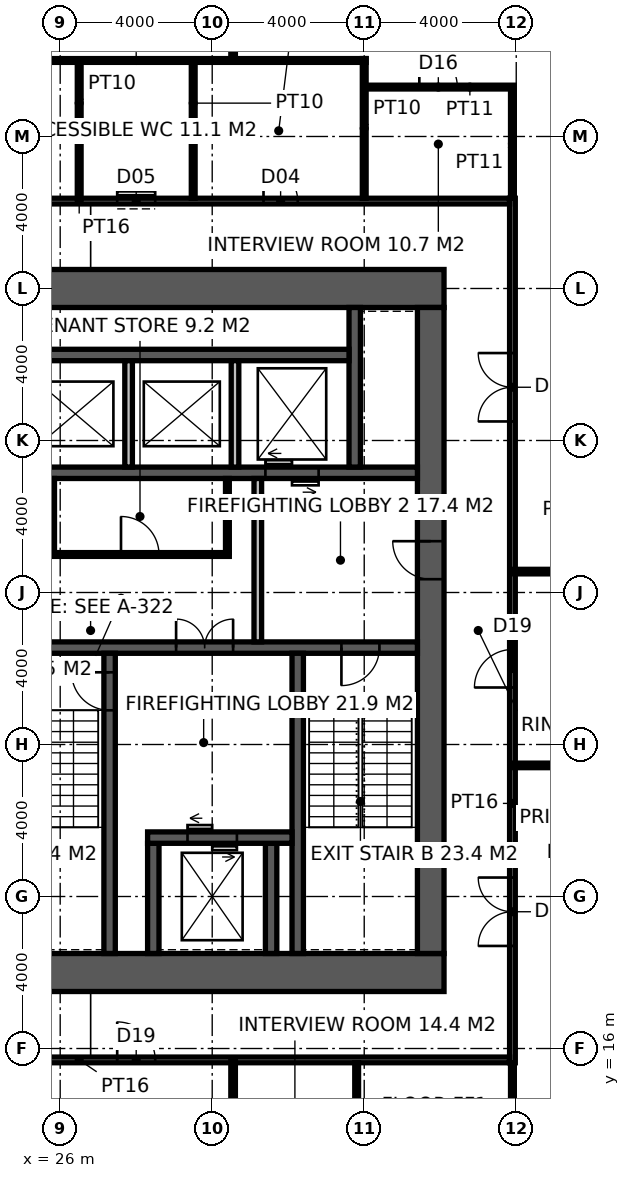
"""IFC4 building model, lengths in metres.
Left out: names, types, materials, properties, quantities, classifications, styles, units other than length and angle.
Written with IfcOpenShell. Run it as: python <this file> out.ifc"""

import sys

from ifc_helpers import new_model, si_unit, direction, frame, frame_2d, origin, place, context, subcontext, project, spatial, rectangle, extrude, element, fill, save


model = new_model("IFC4")
c1 = context("Model", 3, precision=1e-05, world=origin(), true_north=direction((0.0, 1.0)))
c2 = subcontext(c1, "Body", "Model", "MODEL_VIEW")
j1 = project(units=[si_unit("LENGTHUNIT", "METRE"), si_unit("PLANEANGLEUNIT", "RADIAN")], contexts=[c1])
p1 = place(None, origin())
s1 = spatial("IfcSite", under=j1, at=p1, CompositionType="ELEMENT")
p2 = place(p1, origin())
s2 = spatial("IfcBuilding", under=s1, at=p2, CompositionType="ELEMENT")
p3 = place(p2, frame((0.0, 0.0, 105.4)))
s3 = spatial("IfcBuildingStorey", under=s2, at=p3, CompositionType="ELEMENT", Elevation=105.4)
p4 = place(p3, frame((18.5, 18.0, -0.15), z_axis=(0.0, 0.0, 1.0), x_axis=(1.0, 0.0, 0.0)))
e1 = element("IfcWall", 1, at=p4, inside=s3, PredefinedType="SHEAR", context=c2, shape_type="SweptSolid", body=[
    extrude(rectangle(XDim=17.6, YDim=1.0, at=frame_2d((8.8, 0.0))), origin(), (0.0, 0.0, 1.0), 4.0),
])
p5 = place(p4, frame((3.45, 0.0, 0.15)))
e2 = element("IfcOpeningElement", 2, at=p5, cuts=e1, PredefinedType="OPENING", context=c2, shape_type="SweptSolid", body=[
    extrude(rectangle(XDim=1.5, YDim=2.4, at=frame_2d((0.75, 1.2))), frame((0.0, 0.51, 0.0), z_axis=(0.0, -1.0, 0.0), x_axis=(1.0, 0.0, 0.0)), (0.0, 0.0, 1.0), 1.02),
])
p6 = place(p3, frame((18.5, 36.0, -0.15), z_axis=(0.0, 0.0, 1.0), x_axis=(1.0, 0.0, 0.0)))
e3 = element("IfcWall", 3, at=p6, inside=s3, PredefinedType="SHEAR", context=c2, shape_type="SweptSolid", body=[
    extrude(rectangle(XDim=17.6, YDim=1.0, at=frame_2d((8.8, 0.0))), origin(), (0.0, 0.0, 1.0), 4.0),
])
p7 = place(p3, frame((35.75, 18.5, -0.15), z_axis=(0.0, 0.0, 1.0), x_axis=(0.0, 1.0, 0.0)))
e4 = element("IfcWall", 4, at=p7, inside=s3, PredefinedType="SHEAR", context=c2, shape_type="SweptSolid", body=[
    extrude(rectangle(XDim=17.0, YDim=0.7, at=frame_2d((8.5, 0.0))), origin(), (0.0, 0.0, 1.0), 4.0),
])
p8 = place(p7, frame((9.85, 0.0, 0.15)))
e5 = element("IfcOpeningElement", 5, at=p8, cuts=e4, PredefinedType="OPENING", context=c2, shape_type="SweptSolid", body=[
    extrude(rectangle(XDim=1.0, YDim=2.2, at=frame_2d((0.5, 1.1))), frame((0.0, 0.36, 0.0), z_axis=(0.0, -1.0, 0.0), x_axis=(1.0, 0.0, 0.0)), (0.0, 0.0, 1.0), 0.72),
])
p9 = place(p3, frame((24.15, 26.55, -0.15), z_axis=(0.0, 0.0, 1.0), x_axis=(1.0, 0.0, 0.0)))
e6 = element("IfcWall", 6, at=p9, inside=s3, PredefinedType="SHEAR", context=c2, shape_type="SweptSolid", body=[
    extrude(rectangle(XDim=11.25, YDim=0.3, at=frame_2d((5.625, 0.0))), origin(), (0.0, 0.0, 1.0), 4.0),
])
p10 = place(p9, frame((9.25, 0.0, 0.15)))
e7 = element("IfcOpeningElement", 7, at=p10, cuts=e6, PredefinedType="OPENING", context=c2, shape_type="SweptSolid", body=[
    extrude(rectangle(XDim=1.0, YDim=2.2, at=frame_2d((0.5, 1.1))), frame((0.0, 0.16, 0.0), z_axis=(0.0, -1.0, 0.0), x_axis=(1.0, 0.0, 0.0)), (0.0, 0.0, 1.0), 0.32),
])
p11 = place(p9, frame((4.9, 0.0, 0.15)))
e8 = element("IfcOpeningElement", 8, at=p11, cuts=e6, PredefinedType="OPENING", context=c2, shape_type="SweptSolid", body=[
    extrude(rectangle(XDim=1.5, YDim=2.4, at=frame_2d((0.75, 1.2))), frame((0.0, 0.16, 0.0), z_axis=(0.0, -1.0, 0.0), x_axis=(1.0, 0.0, 0.0)), (0.0, 0.0, 1.0), 0.32),
])
p12 = place(p3, frame((27.3, 18.5, -0.15), z_axis=(0.0, 0.0, 1.0), x_axis=(0.0, 1.0, 0.0)))
e9 = element("IfcWall", 9, at=p12, inside=s3, PredefinedType="SHEAR", context=c2, shape_type="SweptSolid", body=[
    extrude(rectangle(XDim=7.9, YDim=0.3, at=frame_2d((3.95, 0.0))), origin(), (0.0, 0.0, 1.0), 4.0),
])
p13 = place(p12, frame((6.4, 0.0, 0.15)))
e10 = element("IfcOpeningElement", 10, at=p13, cuts=e9, PredefinedType="OPENING", context=c2, shape_type="SweptSolid", body=[
    extrude(rectangle(XDim=1.0, YDim=2.2, at=frame_2d((0.5, 1.1))), frame((0.0, 0.16, 0.0), z_axis=(0.0, -1.0, 0.0), x_axis=(1.0, 0.0, 0.0)), (0.0, 0.0, 1.0), 0.32),
])
p14 = place(p3, frame((32.25, 18.5, -0.15), z_axis=(0.0, 0.0, 1.0), x_axis=(0.0, 1.0, 0.0)))
e11 = element("IfcWall", 11, at=p14, inside=s3, PredefinedType="SHEAR", context=c2, shape_type="SweptSolid", body=[
    extrude(rectangle(XDim=7.9, YDim=0.3, at=frame_2d((3.95, 0.0))), origin(), (0.0, 0.0, 1.0), 4.0),
])
for number, where, z_axis, x_axis in (
    (12, (28.45, 18.5, -0.15), (0.0, 0.0, 1.0), (0.0, 1.0, 0.0)),
    (13, (31.55, 18.5, -0.15), (0.0, 0.0, 1.0), (0.0, 1.0, 0.0)),
):
    element("IfcWall", number, at=place(p3, frame(where, z_axis=z_axis, x_axis=x_axis)), inside=s3, PredefinedType="SHEAR", context=c2, shape_type="SweptSolid", body=[
        extrude(rectangle(XDim=2.9, YDim=0.3, at=frame_2d((1.45, 0.0))), origin(), (0.0, 0.0, 1.0), 4.0),
    ])
p15 = place(p3, frame((28.3, 21.55, -0.15), z_axis=(0.0, 0.0, 1.0), x_axis=(1.0, 0.0, 0.0)))
e14 = element("IfcWall", 14, at=p15, inside=s3, PredefinedType="SHEAR", context=c2, shape_type="SweptSolid", body=[
    extrude(rectangle(XDim=3.8, YDim=0.3, at=frame_2d((1.9, 0.0))), origin(), (0.0, 0.0, 1.0), 4.0),
])
p16 = place(p15, frame((1.05, 0.0, 0.15)))
e15 = element("IfcOpeningElement", 15, at=p16, cuts=e14, PredefinedType="OPENING", context=c2, shape_type="SweptSolid", body=[
    extrude(rectangle(XDim=1.3, YDim=2.4, at=frame_2d((0.65, 1.2))), frame((0.0, 0.16, 0.0), z_axis=(0.0, -1.0, 0.0), x_axis=(1.0, 0.0, 0.0)), (0.0, 0.0, 1.0), 0.32),
])
p17 = place(p3, frame((24.15, 31.15, -0.15), z_axis=(0.0, 0.0, 1.0), x_axis=(1.0, 0.0, 0.0)))
e16 = element("IfcWall", 16, at=p17, inside=s3, PredefinedType="SHEAR", context=c2, shape_type="SweptSolid", body=[
    extrude(rectangle(XDim=11.25, YDim=0.3, at=frame_2d((5.625, 0.0))), origin(), (0.0, 0.0, 1.0), 4.0),
])
p18 = place(p17, frame((7.25, 0.0, 0.15)))
e17 = element("IfcOpeningElement", 17, at=p18, cuts=e16, PredefinedType="OPENING", context=c2, shape_type="SweptSolid", body=[
    extrude(rectangle(XDim=1.4, YDim=2.4, at=frame_2d((0.7, 1.2))), frame((0.0, 0.16, 0.0), z_axis=(0.0, -1.0, 0.0), x_axis=(1.0, 0.0, 0.0)), (0.0, 0.0, 1.0), 0.32),
])
p19 = place(p3, frame((33.75, 31.3, -0.15), z_axis=(0.0, 0.0, 1.0), x_axis=(0.0, 1.0, 0.0)))
e18 = element("IfcWall", 18, at=p19, inside=s3, PredefinedType="SHEAR", context=c2, shape_type="SweptSolid", body=[
    extrude(rectangle(XDim=4.2, YDim=0.3, at=frame_2d((2.1, 0.0))), origin(), (0.0, 0.0, 1.0), 4.0),
])
p20 = place(p3, frame((25.0, 34.25, -0.15), z_axis=(0.0, 0.0, 1.0), x_axis=(1.0, 0.0, 0.0)))
e19 = element("IfcWall", 19, at=p20, inside=s3, PredefinedType="SHEAR", context=c2, shape_type="SweptSolid", body=[
    extrude(rectangle(XDim=8.6, YDim=0.3, at=frame_2d((4.3, 0.0))), origin(), (0.0, 0.0, 1.0), 4.0),
])
for number, where, z_axis, x_axis in (
    (20, (27.8, 31.3, -0.15), (0.0, 0.0, 1.0), (0.0, 1.0, 0.0)),
    (21, (30.6, 31.3, -0.15), (0.0, 0.0, 1.0), (0.0, 1.0, 0.0)),
):
    element("IfcWall", number, at=place(p3, frame(where, z_axis=z_axis, x_axis=x_axis)), inside=s3, PredefinedType="SOLIDWALL", context=c2, shape_type="SweptSolid", body=[
        extrude(rectangle(XDim=2.8, YDim=0.2, at=frame_2d((1.4, 0.0))), origin(), (0.0, 0.0, 1.0), 4.0),
    ])
p21 = place(p3, frame((31.2, 26.7, 0.0), z_axis=(0.0, 0.0, 1.0), x_axis=(0.0, 1.0, 0.0)))
e22 = element("IfcWall", 22, at=p21, inside=s3, PredefinedType="SOLIDWALL", context=c2, shape_type="SweptSolid", body=[
    extrude(rectangle(XDim=4.3, YDim=0.2, at=frame_2d((2.15, 0.0))), origin(), (0.0, 0.0, 1.0), 3.85),
])
p22 = place(p3, frame((25.75, 29.0, 0.0), z_axis=(0.0, 0.0, 1.0), x_axis=(1.0, 0.0, 0.0)))
e23 = element("IfcWall", 23, at=p22, inside=s3, PredefinedType="PARTITIONING", context=c2, shape_type="SweptSolid", body=[
    extrude(rectangle(XDim=4.7, YDim=0.1, at=frame_2d((2.35, 0.0))), origin(), (0.0, 0.0, 1.0), 3.85),
])
p23 = place(p22, frame((1.85, 0.0, 0.0)))
e24 = element("IfcOpeningElement", 24, at=p23, cuts=e23, PredefinedType="OPENING", context=c2, shape_type="SweptSolid", body=[
    extrude(rectangle(XDim=1.0, YDim=2.2, at=frame_2d((0.5, 1.1))), frame((0.0, 0.06, 0.0), z_axis=(0.0, -1.0, 0.0), x_axis=(1.0, 0.0, 0.0)), (0.0, 0.0, 1.0), 0.12),
])
for number, where, z_axis, x_axis in (
    (25, (25.8, 29.05, 0.0), (0.0, 0.0, 1.0), (0.0, 1.0, 0.0)),
    (26, (30.4, 29.05, 0.0), (0.0, 0.0, 1.0), (0.0, 1.0, 0.0)),
):
    element("IfcWall", number, at=place(p3, frame(where, z_axis=z_axis, x_axis=x_axis)), inside=s3, PredefinedType="PARTITIONING", context=c2, shape_type="SweptSolid", body=[
        extrude(rectangle(XDim=1.95, YDim=0.1, at=frame_2d((0.975, 0.0))), origin(), (0.0, 0.0, 1.0), 3.85),
    ])
p24 = place(p3, frame((37.9, 15.625, 0.0), z_axis=(0.0, 0.0, 1.0), x_axis=(0.0, 1.0, 0.0)))
e27 = element("IfcWall", 27, at=p24, inside=s3, PredefinedType="PARTITIONING", context=c2, shape_type="SweptSolid", body=[
    extrude(rectangle(XDim=22.75, YDim=0.15, at=frame_2d((11.375, 0.0))), origin(), (0.0, 0.0, 1.0), 2.65),
])
p25 = place(p24, frame((3.074, 0.0, 0.0)))
e28 = element("IfcOpeningElement", 28, at=p25, cuts=e27, PredefinedType="OPENING", context=c2, shape_type="SweptSolid", body=[
    extrude(rectangle(XDim=1.8, YDim=2.4, at=frame_2d((0.9, 1.2))), frame((0.0, 0.085, 0.0), z_axis=(0.0, -1.0, 0.0), x_axis=(1.0, 0.0, 0.0)), (0.0, 0.0, 1.0), 0.17),
])
p26 = place(p24, frame((16.876, 0.0, 0.0)))
e29 = element("IfcOpeningElement", 29, at=p26, cuts=e27, PredefinedType="OPENING", context=c2, shape_type="SweptSolid", body=[
    extrude(rectangle(XDim=1.8, YDim=2.4, at=frame_2d((0.9, 1.2))), frame((0.0, 0.085, 0.0), z_axis=(0.0, -1.0, 0.0), x_axis=(1.0, 0.0, 0.0)), (0.0, 0.0, 1.0), 0.17),
])
p27 = place(p24, frame((9.875, 0.0, 0.0)))
e30 = element("IfcOpeningElement", 30, at=p27, cuts=e27, PredefinedType="OPENING", context=c2, shape_type="SweptSolid", body=[
    extrude(rectangle(XDim=1.0, YDim=2.2, at=frame_2d((0.5, 1.1))), frame((0.0, 0.085, 0.0), z_axis=(0.0, -1.0, 0.0), x_axis=(1.0, 0.0, 0.0)), (0.0, 0.0, 1.0), 0.17),
])
p28 = place(p3, frame((15.175, 15.7, 0.0), z_axis=(0.0, 0.0, 1.0), x_axis=(1.0, 0.0, 0.0)))
e31 = element("IfcWall", 31, at=p28, inside=s3, PredefinedType="PARTITIONING", context=c2, shape_type="SweptSolid", body=[
    extrude(rectangle(XDim=22.65, YDim=0.15, at=frame_2d((11.325, 0.0))), origin(), (0.0, 0.0, 1.0), 3.85),
])
p29 = place(p28, frame((12.325, 0.0, 0.0)))
e32 = element("IfcOpeningElement", 32, at=p29, cuts=e31, PredefinedType="OPENING", context=c2, shape_type="SweptSolid", body=[
    extrude(rectangle(XDim=1.0, YDim=2.2, at=frame_2d((0.5, 1.1))), frame((0.0, 0.085, 0.0), z_axis=(0.0, -1.0, 0.0), x_axis=(1.0, 0.0, 0.0)), (0.0, 0.0, 1.0), 0.17),
])
p30 = place(p3, frame((15.175, 38.3, 0.0), z_axis=(0.0, 0.0, 1.0), x_axis=(1.0, 0.0, 0.0)))
e33 = element("IfcWall", 33, at=p30, inside=s3, PredefinedType="PARTITIONING", context=c2, shape_type="SweptSolid", body=[
    extrude(rectangle(XDim=22.65, YDim=0.15, at=frame_2d((11.325, 0.0))), origin(), (0.0, 0.0, 1.0), 3.85),
])
p31 = place(p30, frame((8.575, 0.0, 0.0)))
e34 = element("IfcOpeningElement", 34, at=p31, cuts=e33, PredefinedType="OPENING", context=c2, shape_type="SweptSolid", body=[
    extrude(rectangle(XDim=0.9, YDim=2.1, at=frame_2d((0.45, 1.05))), frame((0.0, 0.085, 0.0), z_axis=(0.0, -1.0, 0.0), x_axis=(1.0, 0.0, 0.0)), (0.0, 0.0, 1.0), 0.17),
])
p32 = place(p30, frame((12.325, 0.0, 0.0)))
e35 = element("IfcOpeningElement", 35, at=p32, cuts=e33, PredefinedType="OPENING", context=c2, shape_type="SweptSolid", body=[
    extrude(rectangle(XDim=1.0, YDim=2.1, at=frame_2d((0.5, 1.05))), frame((0.0, 0.085, 0.0), z_axis=(0.0, -1.0, 0.0), x_axis=(1.0, 0.0, 0.0)), (0.0, 0.0, 1.0), 0.17),
])
p33 = place(p30, frame((16.175, 0.0, 0.0)))
e36 = element("IfcOpeningElement", 36, at=p33, cuts=e33, PredefinedType="OPENING", context=c2, shape_type="SweptSolid", body=[
    extrude(rectangle(XDim=0.9, YDim=2.1, at=frame_2d((0.45, 1.05))), frame((0.0, 0.085, 0.0), z_axis=(0.0, -1.0, 0.0), x_axis=(1.0, 0.0, 0.0)), (0.0, 0.0, 1.0), 0.17),
])
p34 = place(p3, frame((34.0, 38.375, 0.0), z_axis=(0.0, 0.0, 1.0), x_axis=(0.0, 1.0, 0.0)))
e37 = element("IfcWall", 37, at=p34, inside=s3, PredefinedType="PARTITIONING", context=c2, shape_type="SweptSolid", body=[
    extrude(rectangle(XDim=3.675, YDim=0.1, at=frame_2d((1.837, 0.0))), origin(), (0.0, 0.0, 1.0), 2.95),
])
p35 = place(p3, frame((21.95, 42.0, 0.0), z_axis=(0.0, 0.0, 1.0), x_axis=(1.0, 0.0, 0.0)))
e38 = element("IfcWall", 38, at=p35, inside=s3, PredefinedType="PARTITIONING", context=c2, shape_type="SweptSolid", body=[
    extrude(rectangle(XDim=12.1, YDim=0.1, at=frame_2d((6.05, 0.0))), origin(), (0.0, 0.0, 1.0), 3.85),
])
for number, where, z_axis, x_axis in (
    (39, (26.5, 38.375, 0.0), (0.0, 0.0, 1.0), (0.0, 1.0, 0.0)),
    (40, (29.5, 38.375, 0.0), (0.0, 0.0, 1.0), (0.0, 1.0, 0.0)),
):
    element("IfcWall", number, at=place(p3, frame(where, z_axis=z_axis, x_axis=x_axis)), inside=s3, PredefinedType="PARTITIONING", context=c2, shape_type="SweptSolid", body=[
        extrude(rectangle(XDim=3.575, YDim=0.1, at=frame_2d((1.788, 0.0))), origin(), (0.0, 0.0, 1.0), 3.85),
    ])
p36 = place(p3, frame((30.55, 4.68, 0.0), z_axis=(0.0, 0.0, 1.0), x_axis=(0.0, 1.0, 0.0)))
e41 = element("IfcWall", 41, at=p36, inside=s3, PredefinedType="PARTITIONING", context=c2, shape_type="SweptSolid", body=[
    extrude(rectangle(XDim=11.02, YDim=0.12, at=frame_2d((5.51, 0.0))), origin(), (0.0, 0.0, 1.0), 2.65),
])
for number, where, z_axis, x_axis in (
    (42, (37.9, 23.45, 0.0), (0.0, 0.0, 1.0), (1.0, 0.0, 0.0)),
    (43, (37.9, 28.55, 0.0), (0.0, 0.0, 1.0), (1.0, 0.0, 0.0)),
):
    element("IfcWall", number, at=place(p3, frame(where, z_axis=z_axis, x_axis=x_axis)), inside=s3, PredefinedType="PARTITIONING", context=c2, shape_type="SweptSolid", body=[
        extrude(rectangle(XDim=19.42, YDim=0.12, at=frame_2d((9.71, 0.0))), origin(), (0.0, 0.0, 1.0), 2.65),
    ])
p37 = place(p3, frame((30.55, 42.0, 0.0), z_axis=(0.0, 0.0, 1.0), x_axis=(0.0, 1.0, 0.0)))
e44 = element("IfcWall", 44, at=p37, inside=s3, PredefinedType="PARTITIONING", context=c2, shape_type="SweptSolid", body=[
    extrude(rectangle(XDim=9.32, YDim=0.12, at=frame_2d((4.66, 0.0))), origin(), (0.0, 0.0, 1.0), 3.85),
])
p38 = place(p3, frame((34.05, 41.3, 0.0), z_axis=(0.0, 0.0, 1.0), x_axis=(1.0, 0.0, 0.0)))
e45 = element("IfcWall", 45, at=p38, inside=s3, PredefinedType="PARTITIONING", context=c2, shape_type="SweptSolid", body=[
    extrude(rectangle(XDim=3.9, YDim=0.1, at=frame_2d((1.95, 0.0))), origin(), (0.0, 0.0, 1.0), 3.85),
])
p39 = place(p38, frame((1.4, 0.0, 0.0)))
e46 = element("IfcOpeningElement", 46, at=p39, cuts=e45, PredefinedType="OPENING", context=c2, shape_type="SweptSolid", body=[
    extrude(rectangle(XDim=1.0, YDim=2.2, at=frame_2d((0.5, 1.1))), frame((0.0, 0.06, 0.0), z_axis=(0.0, -1.0, 0.0), x_axis=(1.0, 0.0, 0.0)), (0.0, 0.0, 1.0), 0.12),
])
for number, where, z_axis, x_axis in (
    (47, (33.801, 10.95, 0.0), (0.0, 0.0, 1.0), (0.0, 1.0, 0.0)),
    (48, (37.9, 10.95, 0.0), (0.0, 0.0, 1.0), (0.0, 1.0, 0.0)),
):
    element("IfcWall", number, at=place(p3, frame(where, z_axis=z_axis, x_axis=x_axis)), inside=s3, PredefinedType="PARTITIONING", context=c2, shape_type="SweptSolid", body=[
        extrude(rectangle(XDim=4.675, YDim=0.1, at=frame_2d((2.337, 0.0))), origin(), (0.0, 0.0, 1.0), 2.65),
    ])
p40 = place(p3, frame((37.9, 38.375, 0.0), z_axis=(0.0, 0.0, 1.0), x_axis=(0.0, 1.0, 0.0)))
e49 = element("IfcWall", 49, at=p40, inside=s3, PredefinedType="PARTITIONING", context=c2, shape_type="SweptSolid", body=[
    extrude(rectangle(XDim=2.875, YDim=0.1, at=frame_2d((1.438, 0.0))), origin(), (0.0, 0.0, 1.0), 2.65),
])
p41 = place(p13, origin())
e50 = element("IfcDoor", 50, at=p41, inside=s3, OperationType="SINGLE_SWING_RIGHT", PredefinedType="DOOR", context=c2, shape_type="SweptSolid", body=[
    extrude(rectangle(XDim=1.0, YDim=2.2, at=frame_2d((0.5, 1.1))), frame((0.0, 0.025, 0.0), z_axis=(0.0, -1.0, 0.0), x_axis=(1.0, 0.0, 0.0)), (0.0, 0.0, 1.0), 0.05),
])
fill(e10, e50)
p42 = place(p10, frame((1.0, 0.0, 0.0), z_axis=(0.0, 0.0, 1.0), x_axis=(-1.0, 0.0, 0.0)))
e51 = element("IfcDoor", 51, at=p42, inside=s3, OperationType="SINGLE_SWING_RIGHT", PredefinedType="DOOR", context=c2, shape_type="SweptSolid", body=[
    extrude(rectangle(XDim=1.0, YDim=2.2, at=frame_2d((0.5, 1.1))), frame((0.0, 0.025, 0.0), z_axis=(0.0, -1.0, 0.0), x_axis=(1.0, 0.0, 0.0)), (0.0, 0.0, 1.0), 0.05),
])
fill(e7, e51)
p43 = place(p8, origin())
e52 = element("IfcDoor", 52, at=p43, inside=s3, OperationType="SINGLE_SWING_RIGHT", PredefinedType="DOOR", context=c2, shape_type="SweptSolid", body=[
    extrude(rectangle(XDim=1.0, YDim=2.2, at=frame_2d((0.5, 1.1))), frame((0.0, 0.025, 0.0), z_axis=(0.0, -1.0, 0.0), x_axis=(1.0, 0.0, 0.0)), (0.0, 0.0, 1.0), 0.05),
])
fill(e5, e52)
p44 = place(p11, origin())
e53 = element("IfcDoor", 53, at=p44, inside=s3, OperationType="DOUBLE_DOOR_DOUBLE_SWING", PredefinedType="DOOR", context=c2, shape_type="SweptSolid", body=[
    extrude(rectangle(XDim=1.5, YDim=2.4, at=frame_2d((0.75, 1.2))), frame((0.0, 0.025, 0.0), z_axis=(0.0, -1.0, 0.0), x_axis=(1.0, 0.0, 0.0)), (0.0, 0.0, 1.0), 0.05),
])
fill(e8, e53)
p45 = place(p23, origin())
e54 = element("IfcDoor", 54, at=p45, inside=s3, OperationType="SINGLE_SWING_LEFT", PredefinedType="DOOR", context=c2, shape_type="SweptSolid", body=[
    extrude(rectangle(XDim=1.0, YDim=2.2, at=frame_2d((0.5, 1.1))), frame((0.0, 0.025, 0.0), z_axis=(0.0, -1.0, 0.0), x_axis=(1.0, 0.0, 0.0)), (0.0, 0.0, 1.0), 0.05),
])
fill(e24, e54)
p46 = place(p32, origin())
e55 = element("IfcDoor", 55, at=p46, inside=s3, OperationType="SLIDING_TO_LEFT", PredefinedType="DOOR", context=c2, shape_type="SweptSolid", body=[
    extrude(rectangle(XDim=1.0, YDim=2.1, at=frame_2d((0.5, 1.05))), frame((0.0, 0.025, 0.0), z_axis=(0.0, -1.0, 0.0), x_axis=(1.0, 0.0, 0.0)), (0.0, 0.0, 1.0), 0.05),
])
fill(e35, e55)
p47 = place(p33, origin())
e56 = element("IfcDoor", 56, at=p47, inside=s3, OperationType="SINGLE_SWING_LEFT", PredefinedType="DOOR", context=c2, shape_type="SweptSolid", body=[
    extrude(rectangle(XDim=0.9, YDim=2.1, at=frame_2d((0.45, 1.05))), frame((0.0, 0.025, 0.0), z_axis=(0.0, -1.0, 0.0), x_axis=(1.0, 0.0, 0.0)), (0.0, 0.0, 1.0), 0.05),
])
fill(e36, e56)
p48 = place(p25, origin())
e57 = element("IfcDoor", 57, at=p48, inside=s3, OperationType="DOUBLE_DOOR_DOUBLE_SWING", PredefinedType="DOOR", context=c2, shape_type="SweptSolid", body=[
    extrude(rectangle(XDim=1.8, YDim=2.4, at=frame_2d((0.9, 1.2))), frame((0.0, 0.025, 0.0), z_axis=(0.0, -1.0, 0.0), x_axis=(1.0, 0.0, 0.0)), (0.0, 0.0, 1.0), 0.05),
])
fill(e28, e57)
p49 = place(p26, origin())
e58 = element("IfcDoor", 58, at=p49, inside=s3, OperationType="DOUBLE_DOOR_DOUBLE_SWING", PredefinedType="DOOR", context=c2, shape_type="SweptSolid", body=[
    extrude(rectangle(XDim=1.8, YDim=2.4, at=frame_2d((0.9, 1.2))), frame((0.0, 0.025, 0.0), z_axis=(0.0, -1.0, 0.0), x_axis=(1.0, 0.0, 0.0)), (0.0, 0.0, 1.0), 0.05),
])
fill(e29, e58)
p50 = place(p29, origin())
e59 = element("IfcDoor", 59, at=p50, inside=s3, OperationType="SINGLE_SWING_LEFT", PredefinedType="DOOR", context=c2, shape_type="SweptSolid", body=[
    extrude(rectangle(XDim=1.0, YDim=2.2, at=frame_2d((0.5, 1.1))), frame((0.0, 0.025, 0.0), z_axis=(0.0, -1.0, 0.0), x_axis=(1.0, 0.0, 0.0)), (0.0, 0.0, 1.0), 0.05),
])
fill(e32, e59)
p51 = place(p27, origin())
e60 = element("IfcDoor", 60, at=p51, inside=s3, OperationType="SINGLE_SWING_LEFT", PredefinedType="DOOR", context=c2, shape_type="SweptSolid", body=[
    extrude(rectangle(XDim=1.0, YDim=2.2, at=frame_2d((0.5, 1.1))), frame((0.0, 0.025, 0.0), z_axis=(0.0, -1.0, 0.0), x_axis=(1.0, 0.0, 0.0)), (0.0, 0.0, 1.0), 0.05),
])
fill(e30, e60)
p52 = place(p39, origin())
e61 = element("IfcDoor", 61, at=p52, inside=s3, OperationType="SINGLE_SWING_LEFT", PredefinedType="DOOR", context=c2, shape_type="SweptSolid", body=[
    extrude(rectangle(XDim=1.0, YDim=2.2, at=frame_2d((0.5, 1.1))), frame((0.0, 0.025, 0.0), z_axis=(0.0, -1.0, 0.0), x_axis=(1.0, 0.0, 0.0)), (0.0, 0.0, 1.0), 0.05),
])
fill(e46, e61)
p53 = place(p16, origin())
e62 = element("IfcDoor", 62, at=p53, inside=s3, OperationType="DOUBLE_DOOR_SLIDING", PredefinedType="DOOR", context=c2, shape_type="SweptSolid", body=[
    extrude(rectangle(XDim=1.3, YDim=2.4, at=frame_2d((0.65, 1.2))), frame((0.0, 0.025, 0.0), z_axis=(0.0, -1.0, 0.0), x_axis=(1.0, 0.0, 0.0)), (0.0, 0.0, 1.0), 0.05),
])
fill(e15, e62)
p54 = place(p18, origin())
e63 = element("IfcDoor", 63, at=p54, inside=s3, OperationType="DOUBLE_DOOR_SLIDING", PredefinedType="DOOR", context=c2, shape_type="SweptSolid", body=[
    extrude(rectangle(XDim=1.4, YDim=2.4, at=frame_2d((0.7, 1.2))), frame((0.0, 0.025, 0.0), z_axis=(0.0, -1.0, 0.0), x_axis=(1.0, 0.0, 0.0)), (0.0, 0.0, 1.0), 0.05),
])
fill(e17, e63)
save(model, sys.argv[1])
